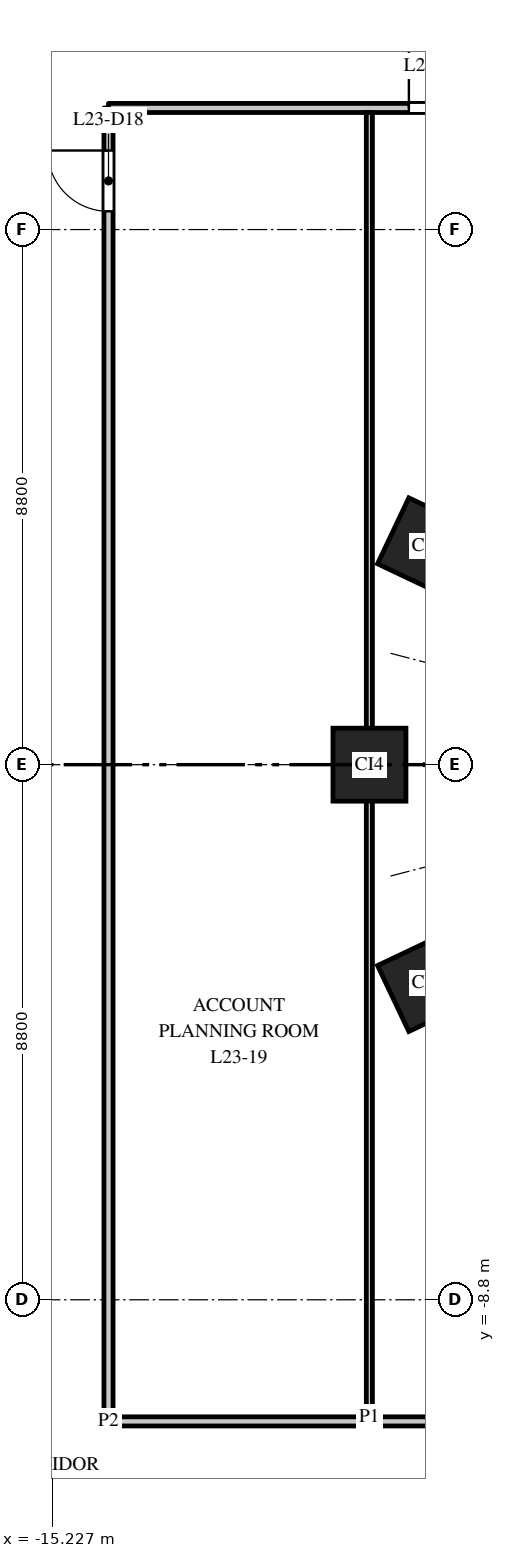
"""IFC4 building model, lengths in metres.
Left out: names, types, materials, properties, quantities, classifications, styles, units other than length and angle.
Written with IfcOpenShell. Run it as: python <this file> out.ifc"""

import sys

from ifc_helpers import new_model, si_unit, direction, frame, frame_2d, origin, origin_2d, place, context, subcontext, project, spatial, rectangle, extrude, element, fill, save


model = new_model("IFC4")
c1 = context("Model", 3, precision=1e-05, world=origin(), true_north=direction((0.0, 1.0)))
c2 = subcontext(c1, "Body", "Model", "MODEL_VIEW")
j1 = project(units=[si_unit("LENGTHUNIT", "METRE"), si_unit("PLANEANGLEUNIT", "RADIAN")], contexts=[c1])
p1 = place(None, origin())
s1 = spatial("IfcSite", under=j1, at=p1, CompositionType="ELEMENT")
p2 = place(p1, origin())
s2 = spatial("IfcBuilding", under=s1, at=p2, CompositionType="ELEMENT")
p3 = place(p2, frame((0.0, 0.0, 104.0)))
s3 = spatial("IfcBuildingStorey", under=s2, at=p3, CompositionType="ELEMENT", Elevation=104.0)
for number, where, z_axis, x_axis in (
    (1, (-9.076, 3.588, 0.0), (0.0, 0.0, 1.0), (-0.429, -0.903, 0.0)),
    (2, (-10.008, 0.0, 0.0), (0.0, 0.0, 1.0), (0.0, -1.0, 0.0)),
    (3, (-9.076, -3.588, 0.0), (0.0, 0.0, 1.0), (0.429, -0.903, 0.0)),
):
    element("IfcColumn", number, at=place(p3, frame(where, z_axis=z_axis, x_axis=x_axis)), inside=s3, PredefinedType="COLUMN", context=c2, shape_type="SweptSolid", body=[
        extrude(rectangle(XDim=1.2, YDim=1.2, at=origin_2d()), origin(), (0.0, 0.0, 1.0), 4.0),
    ])
p4 = place(p3, frame((-14.3, -10.8, 0.0), z_axis=(0.0, 0.0, 1.0), x_axis=(0.0, 1.0, 0.0)))
e4 = element("IfcWall", 4, at=p4, inside=s3, PredefinedType="PARTITIONING", context=c2, shape_type="SweptSolid", body=[
    extrude(rectangle(XDim=21.6, YDim=0.15, at=frame_2d((10.8, 0.0))), origin(), (0.0, 0.0, 1.0), 2.75),
])
p5 = place(p4, frame((19.9, 0.0, 0.0)))
e5 = element("IfcOpeningElement", 5, at=p5, cuts=e4, PredefinedType="OPENING", context=c2, shape_type="SweptSolid", body=[
    extrude(rectangle(XDim=1.0, YDim=2.1, at=frame_2d((0.5, 1.05))), frame((0.0, 0.085, 0.0), z_axis=(0.0, -1.0, 0.0), x_axis=(1.0, 0.0, 0.0)), (0.0, 0.0, 1.0), 0.17),
])
p6 = place(p3, frame((-14.3, -10.8, 0.0), z_axis=(0.0, 0.0, 1.0), x_axis=(1.0, 0.0, 0.0)))
e6 = element("IfcWall", 6, at=p6, inside=s3, PredefinedType="PARTITIONING", context=c2, shape_type="SweptSolid", body=[
    extrude(rectangle(XDim=28.6, YDim=0.15, at=frame_2d((14.3, 0.0))), origin(), (0.0, 0.0, 1.0), 2.85),
])
p7 = place(p6, frame((9.673, 0.0, 0.0)))
e7 = element("IfcOpeningElement", 7, at=p7, cuts=e6, PredefinedType="OPENING", context=c2, shape_type="SweptSolid", body=[
    extrude(rectangle(XDim=1.0, YDim=2.1, at=frame_2d((0.5, 1.05))), frame((0.0, 0.085, 0.0), z_axis=(0.0, -1.0, 0.0), x_axis=(1.0, 0.0, 0.0)), (0.0, 0.0, 1.0), 0.17),
])
p8 = place(p6, frame((14.44, 0.0, 0.0)))
e8 = element("IfcOpeningElement", 8, at=p8, cuts=e6, PredefinedType="OPENING", context=c2, shape_type="SweptSolid", body=[
    extrude(rectangle(XDim=1.0, YDim=2.1, at=frame_2d((0.5, 1.05))), frame((0.0, 0.085, 0.0), z_axis=(0.0, -1.0, 0.0), x_axis=(1.0, 0.0, 0.0)), (0.0, 0.0, 1.0), 0.17),
])
p9 = place(p3, frame((-14.3, 10.8, 0.0), z_axis=(0.0, 0.0, 1.0), x_axis=(1.0, 0.0, 0.0)))
e9 = element("IfcWall", 9, at=p9, inside=s3, PredefinedType="PARTITIONING", context=c2, shape_type="SweptSolid", body=[
    extrude(rectangle(XDim=28.6, YDim=0.15, at=frame_2d((14.3, 0.0))), origin(), (0.0, 0.0, 1.0), 2.85),
])
p10 = place(p9, frame((4.94, 0.0, 0.0)))
e10 = element("IfcOpeningElement", 10, at=p10, cuts=e9, PredefinedType="OPENING", context=c2, shape_type="SweptSolid", body=[
    extrude(rectangle(XDim=1.0, YDim=2.1, at=frame_2d((0.5, 1.05))), frame((0.0, 0.085, 0.0), z_axis=(0.0, -1.0, 0.0), x_axis=(1.0, 0.0, 0.0)), (0.0, 0.0, 1.0), 0.17),
])
p11 = place(p9, frame((9.707, 0.0, 0.0)))
e11 = element("IfcOpeningElement", 11, at=p11, cuts=e9, PredefinedType="OPENING", context=c2, shape_type="SweptSolid", body=[
    extrude(rectangle(XDim=1.0, YDim=2.1, at=frame_2d((0.5, 1.05))), frame((0.0, 0.085, 0.0), z_axis=(0.0, -1.0, 0.0), x_axis=(1.0, 0.0, 0.0)), (0.0, 0.0, 1.0), 0.17),
])
p12 = place(p9, frame((14.473, 0.0, 0.0)))
e12 = element("IfcOpeningElement", 12, at=p12, cuts=e9, PredefinedType="OPENING", context=c2, shape_type="SweptSolid", body=[
    extrude(rectangle(XDim=1.0, YDim=2.1, at=frame_2d((0.5, 1.05))), frame((0.0, 0.085, 0.0), z_axis=(0.0, -1.0, 0.0), x_axis=(1.0, 0.0, 0.0)), (0.0, 0.0, 1.0), 0.17),
])
p13 = place(p3, frame((-10.01, -10.725, 0.0), z_axis=(0.0, 0.0, 1.0), x_axis=(0.0, 1.0, 0.0)))
e13 = element("IfcWall", 13, at=p13, inside=s3, PredefinedType="PARTITIONING", context=c2, shape_type="SweptSolid", body=[
    extrude(rectangle(XDim=21.45, YDim=0.1, at=frame_2d((10.725, 0.0))), origin(), (0.0, 0.0, 1.0), 2.75),
])
p14 = place(p5, origin())
e14 = element("IfcDoor", 14, at=p14, inside=s3, OperationType="SINGLE_SWING_RIGHT", PredefinedType="DOOR", context=c2, shape_type="SweptSolid", body=[
    extrude(rectangle(XDim=1.0, YDim=2.1, at=frame_2d((0.5, 1.05))), frame((0.0, 0.025, 0.0), z_axis=(0.0, -1.0, 0.0), x_axis=(1.0, 0.0, 0.0)), (0.0, 0.0, 1.0), 0.05),
])
fill(e5, e14)
p15 = place(p10, origin())
e15 = element("IfcDoor", 15, at=p15, inside=s3, OperationType="SINGLE_SWING_LEFT", PredefinedType="DOOR", context=c2, shape_type="SweptSolid", body=[
    extrude(rectangle(XDim=1.0, YDim=2.1, at=frame_2d((0.5, 1.05))), frame((0.0, 0.025, 0.0), z_axis=(0.0, -1.0, 0.0), x_axis=(1.0, 0.0, 0.0)), (0.0, 0.0, 1.0), 0.05),
])
fill(e10, e15)
save(model, sys.argv[1])
